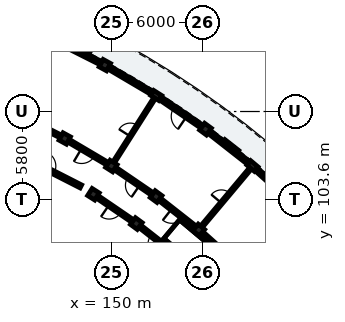
"""IFC4 building model, lengths in metres.
Left out: names, types, materials, properties, quantities, classifications, styles, units other than length and angle.
Written with IfcOpenShell. Run it as: python <this file> out.ifc"""

import sys

from ifc_helpers import new_model, si_unit, direction, frame, frame_2d, origin, origin_2d, place, context, subcontext, project, spatial, rectangle, extrude, element, fill, save


model = new_model("IFC4")
c1 = context("Model", 3, precision=1e-05, world=origin(), true_north=direction((0.0, 1.0)))
c2 = subcontext(c1, "Body", "Model", "MODEL_VIEW")
j1 = project(units=[si_unit("LENGTHUNIT", "METRE"), si_unit("PLANEANGLEUNIT", "RADIAN")], contexts=[c1])
p1 = place(None, origin())
s1 = spatial("IfcSite", under=j1, at=p1, CompositionType="ELEMENT")
p2 = place(p1, origin())
s2 = spatial("IfcBuilding", under=s1, at=p2, CompositionType="ELEMENT")
p3 = place(p2, frame((0.0, 0.0, 15.56)))
s3 = spatial("IfcBuildingStorey", under=s2, at=p3, CompositionType="ELEMENT", Elevation=15.56)
p4 = place(p3, frame((155.743, 101.605, 0.0), z_axis=(0.0, 0.0, 1.0), x_axis=(0.642787582947, 0.766044465556, 0.0)))
e1 = element("IfcColumn", 1, at=p4, inside=s3, PredefinedType="COLUMN", context=c2, shape_type="SweptSolid", body=[
    extrude(rectangle(XDim=0.55, YDim=0.55, at=origin_2d()), origin(), (0.0, 0.0, 1.0), 3.11),
])
p5 = place(p3, frame((159.278, 105.818, 0.0), z_axis=(0.0, 0.0, 1.0), x_axis=(0.642787582947, 0.766044465556, 0.0)))
e2 = element("IfcColumn", 2, at=p5, inside=s3, PredefinedType="PILASTER", context=c2, shape_type="SweptSolid", body=[
    extrude(rectangle(XDim=0.38, YDim=0.62, at=origin_2d()), origin(), (0.0, 0.0, 1.0), 3.11),
])
for number, where, z_axis, x_axis in (
    (3, (151.639, 102.029, 0.0), (0.0, 0.0, 1.0), (0.591, 0.807, 0.0)),
    (4, (152.939, 103.804, 0.0), (0.0, 0.0, 1.0), (0.591, 0.807, 0.0)),
    (5, (156.189, 108.241, 0.0), (0.0, 0.0, 1.0), (0.591, 0.807, 0.0)),
    (6, (148.817, 103.957, 0.0), (0.0, 0.0, 1.0), (0.536, 0.844, 0.0)),
    (7, (149.997, 105.813, 0.0), (0.0, 0.0, 1.0), (0.536, 0.844, 0.0)),
):
    element("IfcColumn", number, at=place(p3, frame(where, z_axis=z_axis, x_axis=x_axis)), inside=s3, PredefinedType="COLUMN", context=c2, shape_type="SweptSolid", body=[
        extrude(rectangle(XDim=0.55, YDim=0.55, at=origin_2d()), origin(), (0.0, 0.0, 1.0), 3.11),
    ])
p6 = place(p3, frame((152.948, 110.455, 0.0), z_axis=(0.0, 0.0, 1.0), x_axis=(0.536481544469, 0.843912052553, 0.0)))
e8 = element("IfcColumn", 8, at=p6, inside=s3, PredefinedType="PILASTER", context=c2, shape_type="SweptSolid", body=[
    extrude(rectangle(XDim=0.38, YDim=0.62, at=origin_2d()), origin(), (0.0, 0.0, 1.0), 3.11),
])
for number, where, z_axis, x_axis in (
    (9, (146.928, 107.625, 0.0), (0.0, 0.0, 1.0), (0.48, 0.877, 0.0)),
    (10, (149.567, 112.451, 0.0), (0.0, 0.0, 1.0), (0.48, 0.877, 0.0)),
):
    element("IfcColumn", number, at=place(p3, frame(where, z_axis=z_axis, x_axis=x_axis)), inside=s3, PredefinedType="COLUMN", context=c2, shape_type="SweptSolid", body=[
        extrude(rectangle(XDim=0.55, YDim=0.55, at=origin_2d()), origin(), (0.0, 0.0, 1.0), 3.11),
    ])
p7 = place(p3, frame((162.018, 103.36, 0.0), z_axis=(0.0, 0.0, 1.0), x_axis=(-0.744413726571, 0.667718656092, 0.0)))
e11 = element("IfcWall", 11, at=p7, inside=s3, PredefinedType="SOLIDWALL", context=c2, shape_type="SweptSolid", body=[
    extrude(rectangle(XDim=3.521, YDim=0.24, at=frame_2d((1.76, 0.0))), origin(), (0.0, 0.0, 1.0), 2.355),
])
p8 = place(p7, frame((0.92, 0.0, 0.55)))
e12 = element("IfcOpeningElement", 12, at=p8, cuts=e11, PredefinedType="OPENING", context=c2, shape_type="SweptSolid", body=[
    extrude(rectangle(XDim=1.68, YDim=1.585, at=frame_2d((0.84, 0.792))), frame((0.0, 0.13, 0.0), z_axis=(0.0, -1.0, 0.0), x_axis=(1.0, 0.0, 0.0)), (0.0, 0.0, 1.0), 0.26),
])
p9 = place(p3, frame((159.152, 105.917, 0.0), z_axis=(0.0, 0.0, 1.0), x_axis=(-0.786813798172, 0.617190446301, 0.0)))
e13 = element("IfcWall", 13, at=p9, inside=s3, PredefinedType="SOLIDWALL", context=c2, shape_type="SweptSolid", body=[
    extrude(rectangle(XDim=3.521, YDim=0.24, at=frame_2d((1.76, 0.0))), origin(), (0.0, 0.0, 1.0), 2.355),
])
p10 = place(p9, frame((1.185, 0.0, 0.55)))
e14 = element("IfcOpeningElement", 14, at=p10, cuts=e13, PredefinedType="OPENING", context=c2, shape_type="SweptSolid", body=[
    extrude(rectangle(XDim=1.15, YDim=1.5, at=frame_2d((0.575, 0.75))), frame((0.0, 0.13, 0.0), z_axis=(0.0, -1.0, 0.0), x_axis=(1.0, 0.0, 0.0)), (0.0, 0.0, 1.0), 0.26),
])
p11 = place(p3, frame((155.987, 108.379, 0.0), z_axis=(0.0, 0.0, 1.0), x_axis=(-0.825745840472, 0.56404238045, 0.0)))
e15 = element("IfcWall", 15, at=p11, inside=s3, PredefinedType="SOLIDWALL", context=c2, shape_type="SweptSolid", body=[
    extrude(rectangle(XDim=3.521, YDim=0.24, at=frame_2d((1.76, 0.0))), origin(), (0.0, 0.0, 1.0), 2.355),
])
p12 = place(p11, frame((1.25, 0.0, 0.0)))
e16 = element("IfcOpeningElement", 16, at=p12, cuts=e15, PredefinedType="OPENING", context=c2, shape_type="SweptSolid", body=[
    extrude(rectangle(XDim=1.02, YDim=2.14, at=frame_2d((0.51, 1.07))), frame((0.0, 0.13, 0.0), z_axis=(0.0, -1.0, 0.0), x_axis=(1.0, 0.0, 0.0)), (0.0, 0.0, 1.0), 0.26),
])
p13 = place(p3, frame((152.81, 110.536, 0.0), z_axis=(0.0, 0.0, 1.0), x_axis=(-0.861136297738, 0.508374150324, 0.0)))
e17 = element("IfcWall", 17, at=p13, inside=s3, PredefinedType="SOLIDWALL", context=c2, shape_type="SweptSolid", body=[
    extrude(rectangle(XDim=3.521, YDim=0.24, at=frame_2d((1.76, 0.0))), origin(), (0.0, 0.0, 1.0), 2.355),
])
p14 = place(p13, frame((1.035, 0.0, 0.35)))
e18 = element("IfcOpeningElement", 18, at=p14, cuts=e17, PredefinedType="OPENING", context=c2, shape_type="SweptSolid", body=[
    extrude(rectangle(XDim=1.45, YDim=1.7, at=frame_2d((0.725, 0.85))), frame((0.0, 0.13, 0.0), z_axis=(0.0, -1.0, 0.0), x_axis=(1.0, 0.0, 0.0)), (0.0, 0.0, 1.0), 0.26),
])
p15 = place(p3, frame((149.348, 112.561, 0.0), z_axis=(0.0, 0.0, 1.0), x_axis=(-0.892756700232, 0.450539092855, 0.0)))
e19 = element("IfcWall", 19, at=p15, inside=s3, PredefinedType="SOLIDWALL", context=c2, shape_type="SweptSolid", body=[
    extrude(rectangle(XDim=3.521, YDim=0.24, at=frame_2d((1.76, 0.0))), origin(), (0.0, 0.0, 1.0), 2.355),
])
p16 = place(p15, frame((0.96, 0.0, 0.35)))
e20 = element("IfcOpeningElement", 20, at=p16, cuts=e19, PredefinedType="OPENING", context=c2, shape_type="SweptSolid", body=[
    extrude(rectangle(XDim=1.6, YDim=1.75, at=frame_2d((0.8, 0.875))), frame((0.0, 0.13, 0.0), z_axis=(0.0, -1.0, 0.0), x_axis=(1.0, 0.0, 0.0)), (0.0, 0.0, 1.0), 0.26),
])
p17 = place(p3, frame((143.625, 106.696, 0.0), z_axis=(0.0, 0.0, 1.0), x_axis=(0.891003372311, -0.453996685595, 0.0)))
e21 = element("IfcWall", 21, at=p17, inside=s3, PredefinedType="PARTITIONING", context=c2, shape_type="SweptSolid", body=[
    extrude(rectangle(XDim=4.9, YDim=0.22, at=frame_2d((2.45, 0.0))), origin(), (0.0, 0.0, 1.0), 2.34),
])
p18 = place(p17, frame((1.95, 0.0, 0.0)))
e22 = element("IfcOpeningElement", 22, at=p18, cuts=e21, PredefinedType="OPENING", context=c2, shape_type="SweptSolid", body=[
    extrude(rectangle(XDim=0.98, YDim=2.14, at=frame_2d((0.49, 1.07))), frame((0.0, 0.12, 0.0), z_axis=(0.0, -1.0, 0.0), x_axis=(1.0, 0.0, 0.0)), (0.0, 0.0, 1.0), 0.24),
])
p19 = place(p3, frame((158.135, 99.459, 0.0), z_axis=(0.0, 0.0, 1.0), x_axis=(-0.744433521088, 0.667696587291, 0.0)))
e23 = element("IfcWall", 23, at=p19, inside=s3, PredefinedType="PARTITIONING", context=c2, shape_type="SweptSolid", body=[
    extrude(rectangle(XDim=2.863, YDim=0.205, at=frame_2d((1.432, 0.0))), origin(), (0.0, 0.0, 1.0), 2.37),
])
p20 = place(p19, frame((0.947, 0.0, 0.0)))
e24 = element("IfcOpeningElement", 24, at=p20, cuts=e23, PredefinedType="OPENING", context=c2, shape_type="SweptSolid", body=[
    extrude(rectangle(XDim=0.97, YDim=2.15, at=frame_2d((0.485, 1.075))), frame((0.0, 0.113, 0.0), z_axis=(0.0, -1.0, 0.0), x_axis=(1.0, 0.0, 0.0)), (0.0, 0.0, 1.0), 0.225),
])
p21 = place(p3, frame((156.0, 101.911, 0.0), z_axis=(0.0, 0.0, 1.0), x_axis=(0.642811926223, 0.766024038465, 0.0)))
e25 = element("IfcWall", 25, at=p21, inside=s3, PredefinedType="PLUMBINGWALL", context=c2, shape_type="SweptSolid", body=[
    extrude(rectangle(XDim=4.7, YDim=0.15, at=frame_2d((2.35, 0.0))), origin(), (0.0, 0.0, 1.0), 2.37),
])
p22 = place(p21, frame((1.92, 0.0, 0.0)))
e26 = element("IfcOpeningElement", 26, at=p22, cuts=e25, PredefinedType="OPENING", context=c2, shape_type="SweptSolid", body=[
    extrude(rectangle(XDim=0.86, YDim=2.06, at=frame_2d((0.43, 1.03))), frame((0.0, 0.085, 0.0), z_axis=(0.0, -1.0, 0.0), x_axis=(1.0, 0.0, 0.0)), (0.0, 0.0, 1.0), 0.17),
])
p23 = place(p3, frame((155.467, 101.821, 0.0), z_axis=(0.0, 0.0, 1.0), x_axis=(-0.786806323554, 0.617199975061, 0.0)))
e27 = element("IfcWall", 27, at=p23, inside=s3, PredefinedType="PARTITIONING", context=c2, shape_type="SweptSolid", body=[
    extrude(rectangle(XDim=2.863, YDim=0.205, at=frame_2d((1.432, 0.0))), origin(), (0.0, 0.0, 1.0), 2.37),
])
p24 = place(p23, frame((0.957, 0.0, 0.0)))
e28 = element("IfcOpeningElement", 28, at=p24, cuts=e27, PredefinedType="OPENING", context=c2, shape_type="SweptSolid", body=[
    extrude(rectangle(XDim=0.95, YDim=2.13, at=frame_2d((0.475, 1.065))), frame((0.0, 0.113, 0.0), z_axis=(0.0, -1.0, 0.0), x_axis=(1.0, 0.0, 0.0)), (0.0, 0.0, 1.0), 0.225),
])
p25 = place(p3, frame((154.053, 100.135, 0.0), z_axis=(0.0, 0.0, 1.0), x_axis=(-0.786835457019, 0.617162833924, 0.0)))
e29 = element("IfcWall", 29, at=p25, inside=s3, PredefinedType="PARTITIONING", context=c2, shape_type="SweptSolid", body=[
    extrude(rectangle(XDim=2.718, YDim=0.205, at=frame_2d((1.359, 0.0))), origin(), (0.0, 0.0, 1.0), 2.37),
])
p26 = place(p25, frame((0.884, 0.0, 0.0)))
e30 = element("IfcOpeningElement", 30, at=p26, cuts=e29, PredefinedType="OPENING", context=c2, shape_type="SweptSolid", body=[
    extrude(rectangle(XDim=0.95, YDim=2.13, at=frame_2d((0.475, 1.065))), frame((0.0, 0.113, 0.0), z_axis=(0.0, -1.0, 0.0), x_axis=(1.0, 0.0, 0.0)), (0.0, 0.0, 1.0), 0.225),
])
p27 = place(p3, frame((152.65, 104.001, 0.0), z_axis=(0.0, 0.0, 1.0), x_axis=(-0.825779671787, 0.563992848947, 0.0)))
e31 = element("IfcWall", 31, at=p27, inside=s3, PredefinedType="PARTITIONING", context=c2, shape_type="SweptSolid", body=[
    extrude(rectangle(XDim=2.863, YDim=0.205, at=frame_2d((1.432, 0.0))), origin(), (0.0, 0.0, 1.0), 2.37),
])
p28 = place(p27, frame((0.967, 0.0, 0.0)))
e32 = element("IfcOpeningElement", 32, at=p28, cuts=e31, PredefinedType="OPENING", context=c2, shape_type="SweptSolid", body=[
    extrude(rectangle(XDim=0.93, YDim=2.12, at=frame_2d((0.465, 1.06))), frame((0.0, 0.113, 0.0), z_axis=(0.0, -1.0, 0.0), x_axis=(1.0, 0.0, 0.0)), (0.0, 0.0, 1.0), 0.225),
])
p29 = place(p3, frame((151.35, 102.226, 0.0), z_axis=(0.0, 0.0, 1.0), x_axis=(-0.825752009056, 0.56403334967, 0.0)))
e33 = element("IfcWall", 33, at=p29, inside=s3, PredefinedType="PARTITIONING", context=c2, shape_type="SweptSolid", body=[
    extrude(rectangle(XDim=2.718, YDim=0.205, at=frame_2d((1.359, 0.0))), origin(), (0.0, 0.0, 1.0), 2.37),
])
p30 = place(p29, frame((0.894, 0.0, 0.0)))
e34 = element("IfcOpeningElement", 34, at=p30, cuts=e33, PredefinedType="OPENING", context=c2, shape_type="SweptSolid", body=[
    extrude(rectangle(XDim=0.93, YDim=2.12, at=frame_2d((0.465, 1.06))), frame((0.0, 0.113, 0.0), z_axis=(0.0, -1.0, 0.0), x_axis=(1.0, 0.0, 0.0)), (0.0, 0.0, 1.0), 0.225),
])
p31 = place(p3, frame((150.211, 106.151, 0.0), z_axis=(0.0, 0.0, 1.0), x_axis=(0.536492262982, 0.843905238614, 0.0)))
e35 = element("IfcWall", 35, at=p31, inside=s3, PredefinedType="PARTITIONING", context=c2, shape_type="SweptSolid", body=[
    extrude(rectangle(XDim=4.7, YDim=0.125, at=frame_2d((2.35, 0.0))), origin(), (0.0, 0.0, 1.0), 2.37),
])
p32 = place(p31, frame((1.915, 0.0, 0.0)))
e36 = element("IfcOpeningElement", 36, at=p32, cuts=e35, PredefinedType="OPENING", context=c2, shape_type="SweptSolid", body=[
    extrude(rectangle(XDim=0.87, YDim=2.08, at=frame_2d((0.435, 1.04))), frame((0.0, 0.073, 0.0), z_axis=(0.0, -1.0, 0.0), x_axis=(1.0, 0.0, 0.0)), (0.0, 0.0, 1.0), 0.145),
])
p33 = place(p3, frame((149.695, 105.991, 0.0), z_axis=(0.0, 0.0, 1.0), x_axis=(-0.861113214678, 0.508413248753, 0.0)))
e37 = element("IfcWall", 37, at=p33, inside=s3, PredefinedType="PARTITIONING", context=c2, shape_type="SweptSolid", body=[
    extrude(rectangle(XDim=2.863, YDim=0.205, at=frame_2d((1.432, 0.0))), origin(), (0.0, 0.0, 1.0), 2.37),
])
p34 = place(p33, frame((0.937, 0.0, 0.0)))
e38 = element("IfcOpeningElement", 38, at=p34, cuts=e37, PredefinedType="OPENING", context=c2, shape_type="SweptSolid", body=[
    extrude(rectangle(XDim=0.99, YDim=2.16, at=frame_2d((0.495, 1.08))), frame((0.0, 0.113, 0.0), z_axis=(0.0, -1.0, 0.0), x_axis=(1.0, 0.0, 0.0)), (0.0, 0.0, 1.0), 0.225),
])
p35 = place(p3, frame((146.616, 107.782, 0.0), z_axis=(0.0, 0.0, 1.0), x_axis=(-0.89273239336, 0.450587254419, 0.0)))
e39 = element("IfcWall", 39, at=p35, inside=s3, PredefinedType="PARTITIONING", context=c2, shape_type="SweptSolid", body=[
    extrude(rectangle(XDim=2.863, YDim=0.205, at=frame_2d((1.432, 0.0))), origin(), (0.0, 0.0, 1.0), 2.37),
])
p36 = place(p35, frame((0.947, 0.0, 0.0)))
e40 = element("IfcOpeningElement", 40, at=p36, cuts=e39, PredefinedType="OPENING", context=c2, shape_type="SweptSolid", body=[
    extrude(rectangle(XDim=0.97, YDim=2.15, at=frame_2d((0.485, 1.075))), frame((0.0, 0.113, 0.0), z_axis=(0.0, -1.0, 0.0), x_axis=(1.0, 0.0, 0.0)), (0.0, 0.0, 1.0), 0.225),
])
p37 = place(p8, origin())
e41 = element("IfcWindow", 41, at=p37, inside=s3, PartitioningType="SINGLE_PANEL", PredefinedType="WINDOW", context=c2, shape_type="SweptSolid", body=[
    extrude(rectangle(XDim=1.68, YDim=1.585, at=frame_2d((0.84, 0.792))), frame((0.0, 0.03, 0.0), z_axis=(0.0, -1.0, 0.0), x_axis=(1.0, 0.0, 0.0)), (0.0, 0.0, 1.0), 0.06),
])
fill(e12, e41)
p38 = place(p10, origin())
e42 = element("IfcWindow", 42, at=p38, inside=s3, PartitioningType="SINGLE_PANEL", PredefinedType="WINDOW", context=c2, shape_type="SweptSolid", body=[
    extrude(rectangle(XDim=1.15, YDim=1.5, at=frame_2d((0.575, 0.75))), frame((0.0, 0.03, 0.0), z_axis=(0.0, -1.0, 0.0), x_axis=(1.0, 0.0, 0.0)), (0.0, 0.0, 1.0), 0.06),
])
fill(e14, e42)
p39 = place(p12, origin())
e43 = element("IfcDoor", 43, at=p39, inside=s3, OperationType="SINGLE_SWING_LEFT", PredefinedType="DOOR", context=c2, shape_type="SweptSolid", body=[
    extrude(rectangle(XDim=1.02, YDim=2.14, at=frame_2d((0.51, 1.07))), frame((0.0, 0.025, 0.0), z_axis=(0.0, -1.0, 0.0), x_axis=(1.0, 0.0, 0.0)), (0.0, 0.0, 1.0), 0.05),
])
fill(e16, e43)
p40 = place(p14, origin())
e44 = element("IfcWindow", 44, at=p40, inside=s3, PartitioningType="SINGLE_PANEL", PredefinedType="WINDOW", context=c2, shape_type="SweptSolid", body=[
    extrude(rectangle(XDim=1.45, YDim=1.7, at=frame_2d((0.725, 0.85))), frame((0.0, 0.03, 0.0), z_axis=(0.0, -1.0, 0.0), x_axis=(1.0, 0.0, 0.0)), (0.0, 0.0, 1.0), 0.06),
])
fill(e18, e44)
p41 = place(p16, origin())
e45 = element("IfcWindow", 45, at=p41, inside=s3, PartitioningType="SINGLE_PANEL", PredefinedType="WINDOW", context=c2, shape_type="SweptSolid", body=[
    extrude(rectangle(XDim=1.6, YDim=1.75, at=frame_2d((0.8, 0.875))), frame((0.0, 0.03, 0.0), z_axis=(0.0, -1.0, 0.0), x_axis=(1.0, 0.0, 0.0)), (0.0, 0.0, 1.0), 0.06),
])
fill(e20, e45)
p42 = place(p18, origin())
e46 = element("IfcDoor", 46, at=p42, inside=s3, OperationType="SINGLE_SWING_LEFT", PredefinedType="DOOR", context=c2, shape_type="SweptSolid", body=[
    extrude(rectangle(XDim=0.98, YDim=2.14, at=frame_2d((0.49, 1.07))), frame((0.0, 0.025, 0.0), z_axis=(0.0, -1.0, 0.0), x_axis=(1.0, 0.0, 0.0)), (0.0, 0.0, 1.0), 0.05),
])
fill(e22, e46)
p43 = place(p22, origin())
e47 = element("IfcDoor", 47, at=p43, inside=s3, OperationType="SINGLE_SWING_LEFT", PredefinedType="DOOR", context=c2, shape_type="SweptSolid", body=[
    extrude(rectangle(XDim=0.86, YDim=2.06, at=frame_2d((0.43, 1.03))), frame((0.0, 0.025, 0.0), z_axis=(0.0, -1.0, 0.0), x_axis=(1.0, 0.0, 0.0)), (0.0, 0.0, 1.0), 0.05),
])
fill(e26, e47)
p44 = place(p24, origin())
e48 = element("IfcDoor", 48, at=p44, inside=s3, OperationType="SINGLE_SWING_RIGHT", PredefinedType="DOOR", context=c2, shape_type="SweptSolid", body=[
    extrude(rectangle(XDim=0.95, YDim=2.13, at=frame_2d((0.475, 1.065))), frame((0.0, 0.025, 0.0), z_axis=(0.0, -1.0, 0.0), x_axis=(1.0, 0.0, 0.0)), (0.0, 0.0, 1.0), 0.05),
])
fill(e28, e48)
p45 = place(p26, origin())
e49 = element("IfcDoor", 49, at=p45, inside=s3, OperationType="SINGLE_SWING_LEFT", PredefinedType="DOOR", context=c2, shape_type="SweptSolid", body=[
    extrude(rectangle(XDim=0.95, YDim=2.13, at=frame_2d((0.475, 1.065))), frame((0.0, 0.025, 0.0), z_axis=(0.0, -1.0, 0.0), x_axis=(1.0, 0.0, 0.0)), (0.0, 0.0, 1.0), 0.05),
])
fill(e30, e49)
p46 = place(p28, origin())
e50 = element("IfcDoor", 50, at=p46, inside=s3, OperationType="SINGLE_SWING_LEFT", PredefinedType="DOOR", context=c2, shape_type="SweptSolid", body=[
    extrude(rectangle(XDim=0.93, YDim=2.12, at=frame_2d((0.465, 1.06))), frame((0.0, 0.025, 0.0), z_axis=(0.0, -1.0, 0.0), x_axis=(1.0, 0.0, 0.0)), (0.0, 0.0, 1.0), 0.05),
])
fill(e32, e50)
p47 = place(p30, origin())
e51 = element("IfcDoor", 51, at=p47, inside=s3, OperationType="SINGLE_SWING_RIGHT", PredefinedType="DOOR", context=c2, shape_type="SweptSolid", body=[
    extrude(rectangle(XDim=0.93, YDim=2.12, at=frame_2d((0.465, 1.06))), frame((0.0, 0.025, 0.0), z_axis=(0.0, -1.0, 0.0), x_axis=(1.0, 0.0, 0.0)), (0.0, 0.0, 1.0), 0.05),
])
fill(e34, e51)
p48 = place(p32, origin())
e52 = element("IfcDoor", 52, at=p48, inside=s3, OperationType="SINGLE_SWING_LEFT", PredefinedType="DOOR", context=c2, shape_type="SweptSolid", body=[
    extrude(rectangle(XDim=0.87, YDim=2.08, at=frame_2d((0.435, 1.04))), frame((0.0, 0.025, 0.0), z_axis=(0.0, -1.0, 0.0), x_axis=(1.0, 0.0, 0.0)), (0.0, 0.0, 1.0), 0.05),
])
fill(e36, e52)
p49 = place(p34, origin())
e53 = element("IfcDoor", 53, at=p49, inside=s3, OperationType="SINGLE_SWING_RIGHT", PredefinedType="DOOR", context=c2, shape_type="SweptSolid", body=[
    extrude(rectangle(XDim=0.99, YDim=2.16, at=frame_2d((0.495, 1.08))), frame((0.0, 0.025, 0.0), z_axis=(0.0, -1.0, 0.0), x_axis=(1.0, 0.0, 0.0)), (0.0, 0.0, 1.0), 0.05),
])
fill(e38, e53)
save(model, sys.argv[1])
